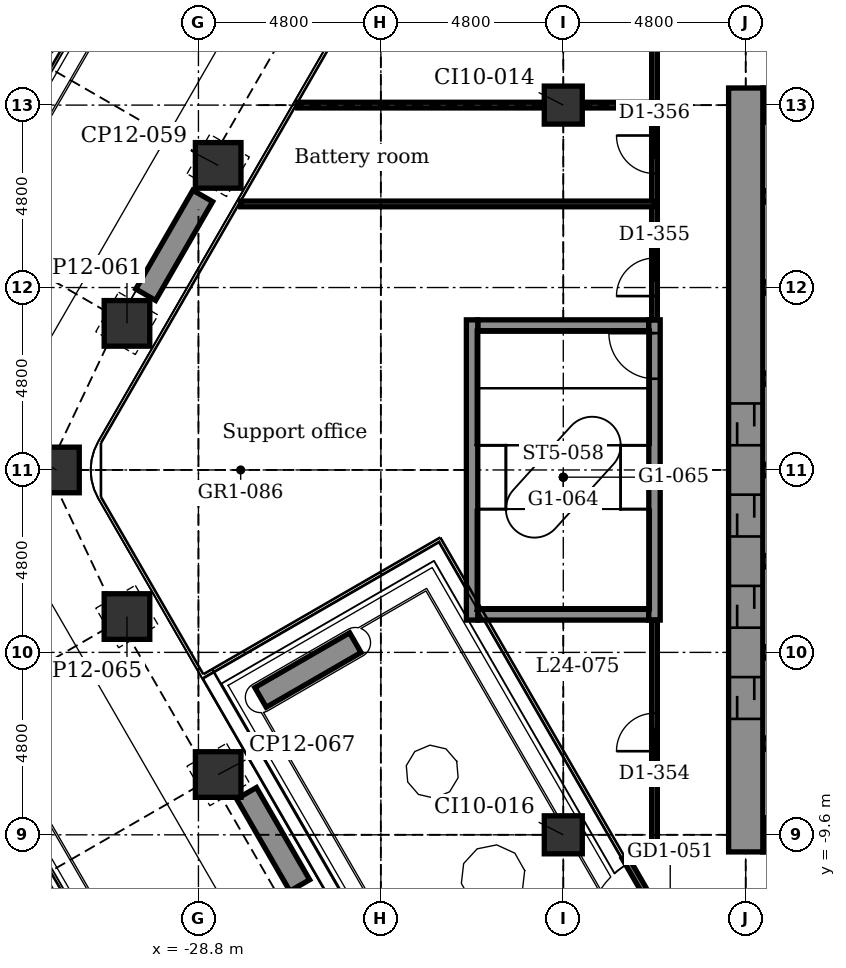
"""IFC4 building model, lengths in metres.
Left out: names, types, materials, properties, quantities, classifications, styles, units other than length and angle.
Written with IfcOpenShell. Run it as: python <this file> out.ifc"""

import sys

from ifc_helpers import new_model, si_unit, direction, frame, frame_2d, origin, origin_2d, place, context, subcontext, project, spatial, rectangle, extrude, element, fill, save


model = new_model("IFC4")
c1 = context("Model", 3, precision=1e-05, world=origin(), true_north=direction((0.0, 1.0)))
c2 = subcontext(c1, "Body", "Model", "MODEL_VIEW")
j1 = project(units=[si_unit("LENGTHUNIT", "METRE"), si_unit("PLANEANGLEUNIT", "RADIAN")], contexts=[c1])
p1 = place(None, origin())
s1 = spatial("IfcSite", under=j1, at=p1, CompositionType="ELEMENT")
p2 = place(p1, origin())
s2 = spatial("IfcBuilding", under=s1, at=p2, CompositionType="ELEMENT")
p3 = place(p2, frame((0.0, 0.0, 122.9)))
s3 = spatial("IfcBuildingStorey", under=s2, at=p3, CompositionType="ELEMENT", Elevation=122.9)
for number, where, z_axis, x_axis in (
    (1, (-28.28, -8.014, -0.2), (0.0, 0.0, 1.0), (0.866, 0.5, 0.0)),
    (2, (-30.68, -3.857, -0.2), (0.0, 0.0, 1.0), (0.866, 0.5, 0.0)),
    (3, (-32.536, 0.0, -0.2), (0.0, 0.0, 1.0), (1.0, 0.0, 0.0)),
    (4, (-30.68, 3.857, -0.2), (0.0, 0.0, 1.0), (0.5, 0.866, 0.0)),
    (5, (-28.28, 8.014, -0.2), (0.0, 0.0, 1.0), (0.5, 0.866, 0.0)),
):
    element("IfcColumn", number, at=place(p3, frame(where, z_axis=z_axis, x_axis=x_axis)), inside=s3, PredefinedType="COLUMN", context=c2, shape_type="SweptSolid", body=[
        extrude(rectangle(XDim=1.2, YDim=1.2, at=origin_2d()), origin(), (0.0, 0.0, 1.0), 4.4),
    ])
for number, where, z_axis, x_axis in (
    (6, (-19.2, -9.6, -0.2), (0.0, 0.0, 1.0), (1.0, 0.0, 0.0)),
    (7, (-19.2, 9.6, -0.2), (0.0, 0.0, 1.0), (1.0, 0.0, 0.0)),
):
    element("IfcColumn", number, at=place(p3, frame(where, z_axis=z_axis, x_axis=x_axis)), inside=s3, PredefinedType="COLUMN", context=c2, shape_type="SweptSolid", body=[
        extrude(rectangle(XDim=1.0, YDim=1.0, at=origin_2d()), origin(), (0.0, 0.0, 1.0), 4.4),
    ])
p4 = place(p3, frame((-13.95, -9.6, -0.2), z_axis=(0.0, 0.0, 1.0), x_axis=(1.0, 0.0, 0.0)))
e8 = element("IfcWall", 8, at=p4, inside=s3, PredefinedType="SHEAR", context=c2, shape_type="SweptSolid", body=[
    extrude(rectangle(XDim=3.9, YDim=0.9, at=frame_2d((1.95, 0.0))), origin(), (0.0, 0.0, 1.0), 4.4),
])
p5 = place(p4, frame((0.05, 0.0, 0.2)))
e9 = element("IfcOpeningElement", 9, at=p5, cuts=e8, PredefinedType="OPENING", context=c2, shape_type="SweptSolid", body=[
    extrude(rectangle(XDim=0.9, YDim=2.1, at=frame_2d((0.45, 1.05))), frame((0.0, 0.46, 0.0), z_axis=(0.0, -1.0, 0.0), x_axis=(1.0, 0.0, 0.0)), (0.0, 0.0, 1.0), 0.92),
])
p6 = place(p4, frame((1.5, 0.0, 0.2)))
e10 = element("IfcOpeningElement", 10, at=p6, cuts=e8, PredefinedType="OPENING", context=c2, shape_type="SweptSolid", body=[
    extrude(rectangle(XDim=0.9, YDim=2.1, at=frame_2d((0.45, 1.05))), frame((0.0, 0.46, 0.0), z_axis=(0.0, -1.0, 0.0), x_axis=(1.0, 0.0, 0.0)), (0.0, 0.0, 1.0), 0.92),
])
p7 = place(p4, frame((2.95, 0.0, 0.2)))
e11 = element("IfcOpeningElement", 11, at=p7, cuts=e8, PredefinedType="OPENING", context=c2, shape_type="SweptSolid", body=[
    extrude(rectangle(XDim=0.9, YDim=2.1, at=frame_2d((0.45, 1.05))), frame((0.0, 0.46, 0.0), z_axis=(0.0, -1.0, 0.0), x_axis=(1.0, 0.0, 0.0)), (0.0, 0.0, 1.0), 0.92),
])
for number, where, z_axis, x_axis in (
    (12, (-13.95, -7.2, -0.2), (0.0, 0.0, 1.0), (1.0, 0.0, 0.0)),
    (13, (-13.95, -4.8, -0.2), (0.0, 0.0, 1.0), (1.0, 0.0, 0.0)),
):
    element("IfcWall", number, at=place(p3, frame(where, z_axis=z_axis, x_axis=x_axis)), inside=s3, PredefinedType="STANDARD", context=c2, shape_type="SweptSolid", body=[
        extrude(rectangle(XDim=3.9, YDim=0.3, at=frame_2d((1.95, 0.0))), origin(), (0.0, 0.0, 1.0), 4.4),
    ])
p8 = place(p3, frame((-21.45, -3.8, -0.2), z_axis=(0.0, 0.0, 1.0), x_axis=(1.0, 0.0, 0.0)))
e14 = element("IfcWall", 14, at=p8, inside=s3, PredefinedType="STANDARD", context=c2, shape_type="SweptSolid", body=[
    extrude(rectangle(XDim=4.5, YDim=0.3, at=frame_2d((2.25, 0.0))), origin(), (0.0, 0.0, 1.0), 4.4),
])
for number, where, z_axis, x_axis in (
    (15, (-13.95, -2.4, -0.2), (0.0, 0.0, 1.0), (1.0, 0.0, 0.0)),
    (16, (-13.95, 0.0, -0.2), (0.0, 0.0, 1.0), (1.0, 0.0, 0.0)),
    (17, (-13.95, 2.4, -0.2), (0.0, 0.0, 1.0), (1.0, 0.0, 0.0)),
):
    element("IfcWall", number, at=place(p3, frame(where, z_axis=z_axis, x_axis=x_axis)), inside=s3, PredefinedType="STANDARD", context=c2, shape_type="SweptSolid", body=[
        extrude(rectangle(XDim=2.8, YDim=0.3, at=frame_2d((1.4, 0.0))), origin(), (0.0, 0.0, 1.0), 4.4),
    ])
p9 = place(p3, frame((-21.45, 3.8, -0.2), z_axis=(0.0, 0.0, 1.0), x_axis=(1.0, 0.0, 0.0)))
e18 = element("IfcWall", 18, at=p9, inside=s3, PredefinedType="STANDARD", context=c2, shape_type="SweptSolid", body=[
    extrude(rectangle(XDim=4.5, YDim=0.3, at=frame_2d((2.25, 0.0))), origin(), (0.0, 0.0, 1.0), 4.4),
])
for number, where, z_axis, x_axis in (
    (19, (-13.95, 4.8, -0.2), (0.0, 0.0, 1.0), (1.0, 0.0, 0.0)),
    (20, (-13.95, 7.2, -0.2), (0.0, 0.0, 1.0), (1.0, 0.0, 0.0)),
):
    element("IfcWall", number, at=place(p3, frame(where, z_axis=z_axis, x_axis=x_axis)), inside=s3, PredefinedType="STANDARD", context=c2, shape_type="SweptSolid", body=[
        extrude(rectangle(XDim=3.9, YDim=0.3, at=frame_2d((1.95, 0.0))), origin(), (0.0, 0.0, 1.0), 4.4),
    ])
p10 = place(p3, frame((-13.95, 9.6, -0.2), z_axis=(0.0, 0.0, 1.0), x_axis=(1.0, 0.0, 0.0)))
e21 = element("IfcWall", 21, at=p10, inside=s3, PredefinedType="SHEAR", context=c2, shape_type="SweptSolid", body=[
    extrude(rectangle(XDim=3.9, YDim=0.9, at=frame_2d((1.95, 0.0))), origin(), (0.0, 0.0, 1.0), 4.4),
])
p11 = place(p10, frame((0.05, 0.0, 0.2)))
e22 = element("IfcOpeningElement", 22, at=p11, cuts=e21, PredefinedType="OPENING", context=c2, shape_type="SweptSolid", body=[
    extrude(rectangle(XDim=0.9, YDim=2.1, at=frame_2d((0.45, 1.05))), frame((0.0, 0.46, 0.0), z_axis=(0.0, -1.0, 0.0), x_axis=(1.0, 0.0, 0.0)), (0.0, 0.0, 1.0), 0.92),
])
p12 = place(p10, frame((1.5, 0.0, 0.2)))
e23 = element("IfcOpeningElement", 23, at=p12, cuts=e21, PredefinedType="OPENING", context=c2, shape_type="SweptSolid", body=[
    extrude(rectangle(XDim=0.9, YDim=2.1, at=frame_2d((0.45, 1.05))), frame((0.0, 0.46, 0.0), z_axis=(0.0, -1.0, 0.0), x_axis=(1.0, 0.0, 0.0)), (0.0, 0.0, 1.0), 0.92),
])
p13 = place(p10, frame((2.95, 0.0, 0.2)))
e24 = element("IfcOpeningElement", 24, at=p13, cuts=e21, PredefinedType="OPENING", context=c2, shape_type="SweptSolid", body=[
    extrude(rectangle(XDim=0.9, YDim=2.1, at=frame_2d((0.45, 1.05))), frame((0.0, 0.46, 0.0), z_axis=(0.0, -1.0, 0.0), x_axis=(1.0, 0.0, 0.0)), (0.0, 0.0, 1.0), 0.92),
])
p14 = place(p3, frame((-21.6, -3.95, -0.2), z_axis=(0.0, 0.0, 1.0), x_axis=(0.0, 1.0, 0.0)))
e25 = element("IfcWall", 25, at=p14, inside=s3, PredefinedType="STANDARD", context=c2, shape_type="SweptSolid", body=[
    extrude(rectangle(XDim=7.9, YDim=0.3, at=frame_2d((3.95, 0.0))), origin(), (0.0, 0.0, 1.0), 4.4),
])
p15 = place(p3, frame((-16.8, -3.95, -0.2), z_axis=(0.0, 0.0, 1.0), x_axis=(0.0, 1.0, 0.0)))
e26 = element("IfcWall", 26, at=p15, inside=s3, PredefinedType="STANDARD", context=c2, shape_type="SweptSolid", body=[
    extrude(rectangle(XDim=7.9, YDim=0.3, at=frame_2d((3.95, 0.0))), origin(), (0.0, 0.0, 1.0), 4.4),
])
p16 = place(p15, frame((6.35, 0.0, 0.2)))
e27 = element("IfcOpeningElement", 27, at=p16, cuts=e26, PredefinedType="OPENING", context=c2, shape_type="SweptSolid", body=[
    extrude(rectangle(XDim=1.2, YDim=2.1, at=frame_2d((0.6, 1.05))), frame((0.0, 0.16, 0.0), z_axis=(0.0, -1.0, 0.0), x_axis=(1.0, 0.0, 0.0)), (0.0, 0.0, 1.0), 0.32),
])
p17 = place(p3, frame((-14.4, -10.05, -0.2), z_axis=(0.0, 0.0, 1.0), x_axis=(0.0, 1.0, 0.0)))
e28 = element("IfcWall", 28, at=p17, inside=s3, PredefinedType="SHEAR", context=c2, shape_type="SweptSolid", body=[
    extrude(rectangle(XDim=20.1, YDim=0.9, at=frame_2d((10.05, 0.0))), origin(), (0.0, 0.0, 1.0), 4.4),
])
p18 = place(p17, frame((3.5, 0.0, 0.2)))
e29 = element("IfcOpeningElement", 29, at=p18, cuts=e28, PredefinedType="OPENING", context=c2, shape_type="SweptSolid", body=[
    extrude(rectangle(XDim=1.1, YDim=2.1, at=frame_2d((0.55, 1.05))), frame((0.0, 0.46, 0.0), z_axis=(0.0, -1.0, 0.0), x_axis=(1.0, 0.0, 0.0)), (0.0, 0.0, 1.0), 0.92),
])
p19 = place(p17, frame((5.9, 0.0, 0.2)))
e30 = element("IfcOpeningElement", 30, at=p19, cuts=e28, PredefinedType="OPENING", context=c2, shape_type="SweptSolid", body=[
    extrude(rectangle(XDim=1.1, YDim=2.1, at=frame_2d((0.55, 1.05))), frame((0.0, 0.46, 0.0), z_axis=(0.0, -1.0, 0.0), x_axis=(1.0, 0.0, 0.0)), (0.0, 0.0, 1.0), 0.92),
])
p20 = place(p17, frame((8.3, 0.0, 0.2)))
e31 = element("IfcOpeningElement", 31, at=p20, cuts=e28, PredefinedType="OPENING", context=c2, shape_type="SweptSolid", body=[
    extrude(rectangle(XDim=1.1, YDim=2.1, at=frame_2d((0.55, 1.05))), frame((0.0, 0.46, 0.0), z_axis=(0.0, -1.0, 0.0), x_axis=(1.0, 0.0, 0.0)), (0.0, 0.0, 1.0), 0.92),
])
p21 = place(p17, frame((10.7, 0.0, 0.2)))
e32 = element("IfcOpeningElement", 32, at=p21, cuts=e28, PredefinedType="OPENING", context=c2, shape_type="SweptSolid", body=[
    extrude(rectangle(XDim=1.1, YDim=2.1, at=frame_2d((0.55, 1.05))), frame((0.0, 0.46, 0.0), z_axis=(0.0, -1.0, 0.0), x_axis=(1.0, 0.0, 0.0)), (0.0, 0.0, 1.0), 0.92),
])
p22 = place(p3, frame((-15.191, -14.325, 0.0), z_axis=(0.0, 0.0, 1.0), x_axis=(-0.500001003139, 0.866024824621, 0.0)))
e33 = element("IfcWall", 33, at=p22, inside=s3, PredefinedType="PARTITIONING", context=c2, shape_type="SweptSolid", body=[
    extrude(rectangle(XDim=4.78, YDim=0.16, at=frame_2d((2.39, 0.0))), origin(), (0.0, 0.0, 1.0), 4.2),
])
p23 = place(p22, frame((1.19, 0.0, 0.0)))
e34 = element("IfcOpeningElement", 34, at=p23, cuts=e33, PredefinedType="OPENING", context=c2, shape_type="SweptSolid", body=[
    extrude(rectangle(XDim=2.4, YDim=2.4, at=frame_2d((1.2, 1.2))), frame((0.0, 0.09, 0.0), z_axis=(0.0, -1.0, 0.0), x_axis=(1.0, 0.0, 0.0)), (0.0, 0.0, 1.0), 0.18),
])
p24 = place(p3, frame((-30.187, 4.611, 0.0), z_axis=(0.0, 0.0, 1.0), x_axis=(0.499990139034, 0.866031096941, 0.0)))
e35 = element("IfcWall", 35, at=p24, inside=s3, PredefinedType="USERDEFINED", context=c2, shape_type="SweptSolid", body=[
    extrude(rectangle(XDim=3.0, YDim=0.6, at=frame_2d((1.5, 0.0))), origin(), (0.0, 0.0, 1.0), 0.7),
])
p25 = place(p3, frame((-24.671, -4.545, 0.0), z_axis=(0.0, 0.0, 1.0), x_axis=(-0.866054314686, -0.499949921505, 0.0)))
e36 = element("IfcWall", 36, at=p25, inside=s3, PredefinedType="USERDEFINED", context=c2, shape_type="SweptSolid", body=[
    extrude(rectangle(XDim=2.88, YDim=0.6, at=frame_2d((1.44, 0.0))), origin(), (0.0, 0.0, 1.0), 0.7),
])
p26 = place(p3, frame((-26.134, -10.932, 0.0), z_axis=(0.0, 0.0, 1.0), x_axis=(-0.49994636267, 0.866056369097, 0.0)))
e37 = element("IfcWall", 37, at=p26, inside=s3, PredefinedType="USERDEFINED", context=c2, shape_type="SweptSolid", body=[
    extrude(rectangle(XDim=2.8, YDim=0.6, at=frame_2d((1.4, 0.0))), origin(), (0.0, 0.0, 1.0), 0.7),
])
p27 = place(p3, frame((-16.8, -10.0, 0.0), z_axis=(0.0, 0.0, 1.0), x_axis=(0.0, 1.0, 0.0)))
e38 = element("IfcWall", 38, at=p27, inside=s3, PredefinedType="PARTITIONING", context=c2, shape_type="SweptSolid", body=[
    extrude(rectangle(XDim=6.05, YDim=0.15, at=frame_2d((3.025, 0.0))), origin(), (0.0, 0.0, 1.0), 4.2),
])
p28 = place(p27, frame((2.6, 0.0, 0.0)))
e39 = element("IfcOpeningElement", 39, at=p28, cuts=e38, PredefinedType="OPENING", context=c2, shape_type="SweptSolid", body=[
    extrude(rectangle(XDim=1.0, YDim=2.1, at=frame_2d((0.5, 1.05))), frame((0.0, 0.085, 0.0), z_axis=(0.0, -1.0, 0.0), x_axis=(1.0, 0.0, 0.0)), (0.0, 0.0, 1.0), 0.17),
])
p29 = place(p3, frame((-16.8, 3.95, 0.0), z_axis=(0.0, 0.0, 1.0), x_axis=(0.0, 1.0, 0.0)))
e40 = element("IfcWall", 40, at=p29, inside=s3, PredefinedType="PARTITIONING", context=c2, shape_type="SweptSolid", body=[
    extrude(rectangle(XDim=9.35, YDim=0.15, at=frame_2d((4.675, 0.0))), origin(), (0.0, 0.0, 1.0), 4.2),
])
p30 = place(p29, frame((0.625, 0.0, 0.0)))
e41 = element("IfcOpeningElement", 41, at=p30, cuts=e40, PredefinedType="OPENING", context=c2, shape_type="SweptSolid", body=[
    extrude(rectangle(XDim=1.0, YDim=2.1, at=frame_2d((0.5, 1.05))), frame((0.0, 0.085, 0.0), z_axis=(0.0, -1.0, 0.0), x_axis=(1.0, 0.0, 0.0)), (0.0, 0.0, 1.0), 0.17),
])
p31 = place(p29, frame((3.85, 0.0, 0.0)))
e42 = element("IfcOpeningElement", 42, at=p31, cuts=e40, PredefinedType="OPENING", context=c2, shape_type="SweptSolid", body=[
    extrude(rectangle(XDim=1.0, YDim=2.1, at=frame_2d((0.5, 1.05))), frame((0.0, 0.085, 0.0), z_axis=(0.0, -1.0, 0.0), x_axis=(1.0, 0.0, 0.0)), (0.0, 0.0, 1.0), 0.17),
])
p32 = place(p29, frame((7.2, 0.0, 0.0)))
e43 = element("IfcOpeningElement", 43, at=p32, cuts=e40, PredefinedType="OPENING", context=c2, shape_type="SweptSolid", body=[
    extrude(rectangle(XDim=1.0, YDim=2.1, at=frame_2d((0.5, 1.05))), frame((0.0, 0.085, 0.0), z_axis=(0.0, -1.0, 0.0), x_axis=(1.0, 0.0, 0.0)), (0.0, 0.0, 1.0), 0.17),
])
p33 = place(p3, frame((-27.688, 7.0, 0.0), z_axis=(0.0, 0.0, 1.0), x_axis=(1.0, 0.0, 0.0)))
e44 = element("IfcWall", 44, at=p33, inside=s3, PredefinedType="PARTITIONING", context=c2, shape_type="SweptSolid", body=[
    extrude(rectangle(XDim=10.888, YDim=0.15, at=frame_2d((5.444, 0.0))), origin(), (0.0, 0.0, 1.0), 4.2),
])
p34 = place(p3, frame((-26.187, 9.6, 0.0), z_axis=(0.0, 0.0, 1.0), x_axis=(1.0, 0.0, 0.0)))
e45 = element("IfcWall", 45, at=p34, inside=s3, PredefinedType="PARTITIONING", context=c2, shape_type="SweptSolid", body=[
    extrude(rectangle(XDim=6.487, YDim=0.15, at=frame_2d((3.243, 0.0))), origin(), (0.0, 0.0, 1.0), 3.592),
])
p35 = place(p3, frame((-18.7, 9.6, 0.0), z_axis=(0.0, 0.0, 1.0), x_axis=(1.0, 0.0, 0.0)))
e46 = element("IfcWall", 46, at=p35, inside=s3, PredefinedType="PARTITIONING", context=c2, shape_type="SweptSolid", body=[
    extrude(rectangle(XDim=1.9, YDim=0.15, at=frame_2d((0.95, 0.0))), origin(), (0.0, 0.0, 1.0), 3.592),
])
p36 = place(p28, origin())
e47 = element("IfcDoor", 47, at=p36, inside=s3, OperationType="SINGLE_SWING_LEFT", PredefinedType="DOOR", context=c2, shape_type="SweptSolid", body=[
    extrude(rectangle(XDim=1.0, YDim=2.1, at=frame_2d((0.5, 1.05))), frame((0.0, 0.025, 0.0), z_axis=(0.0, -1.0, 0.0), x_axis=(1.0, 0.0, 0.0)), (0.0, 0.0, 1.0), 0.05),
])
fill(e39, e47)
p37 = place(p30, origin())
e48 = element("IfcDoor", 48, at=p37, inside=s3, OperationType="SINGLE_SWING_LEFT", PredefinedType="DOOR", context=c2, shape_type="SweptSolid", body=[
    extrude(rectangle(XDim=1.0, YDim=2.1, at=frame_2d((0.5, 1.05))), frame((0.0, 0.025, 0.0), z_axis=(0.0, -1.0, 0.0), x_axis=(1.0, 0.0, 0.0)), (0.0, 0.0, 1.0), 0.05),
])
fill(e41, e48)
p38 = place(p31, origin())
e49 = element("IfcDoor", 49, at=p38, inside=s3, OperationType="SINGLE_SWING_RIGHT", PredefinedType="DOOR", context=c2, shape_type="SweptSolid", body=[
    extrude(rectangle(XDim=1.0, YDim=2.1, at=frame_2d((0.5, 1.05))), frame((0.0, 0.025, 0.0), z_axis=(0.0, -1.0, 0.0), x_axis=(1.0, 0.0, 0.0)), (0.0, 0.0, 1.0), 0.05),
])
fill(e42, e49)
p39 = place(p18, origin())
e50 = element("IfcDoor", 50, at=p39, inside=s3, OperationType="DOUBLE_DOOR_SLIDING", PredefinedType="DOOR", context=c2, shape_type="SweptSolid", body=[
    extrude(rectangle(XDim=1.1, YDim=2.1, at=frame_2d((0.55, 1.05))), frame((0.0, 0.025, 0.0), z_axis=(0.0, -1.0, 0.0), x_axis=(1.0, 0.0, 0.0)), (0.0, 0.0, 1.0), 0.05),
])
fill(e29, e50)
p40 = place(p19, origin())
e51 = element("IfcDoor", 51, at=p40, inside=s3, OperationType="DOUBLE_DOOR_SLIDING", PredefinedType="DOOR", context=c2, shape_type="SweptSolid", body=[
    extrude(rectangle(XDim=1.1, YDim=2.1, at=frame_2d((0.55, 1.05))), frame((0.0, 0.025, 0.0), z_axis=(0.0, -1.0, 0.0), x_axis=(1.0, 0.0, 0.0)), (0.0, 0.0, 1.0), 0.05),
])
fill(e30, e51)
p41 = place(p20, origin())
e52 = element("IfcDoor", 52, at=p41, inside=s3, OperationType="DOUBLE_DOOR_SLIDING", PredefinedType="DOOR", context=c2, shape_type="SweptSolid", body=[
    extrude(rectangle(XDim=1.1, YDim=2.1, at=frame_2d((0.55, 1.05))), frame((0.0, 0.025, 0.0), z_axis=(0.0, -1.0, 0.0), x_axis=(1.0, 0.0, 0.0)), (0.0, 0.0, 1.0), 0.05),
])
fill(e31, e52)
p42 = place(p21, origin())
e53 = element("IfcDoor", 53, at=p42, inside=s3, OperationType="DOUBLE_DOOR_SLIDING", PredefinedType="DOOR", context=c2, shape_type="SweptSolid", body=[
    extrude(rectangle(XDim=1.1, YDim=2.1, at=frame_2d((0.55, 1.05))), frame((0.0, 0.025, 0.0), z_axis=(0.0, -1.0, 0.0), x_axis=(1.0, 0.0, 0.0)), (0.0, 0.0, 1.0), 0.05),
])
fill(e32, e53)
p43 = place(p16, origin())
e54 = element("IfcDoor", 54, at=p43, inside=s3, OperationType="SINGLE_SWING_RIGHT", PredefinedType="DOOR", context=c2, shape_type="SweptSolid", body=[
    extrude(rectangle(XDim=1.2, YDim=2.1, at=frame_2d((0.6, 1.05))), frame((0.0, 0.025, 0.0), z_axis=(0.0, -1.0, 0.0), x_axis=(1.0, 0.0, 0.0)), (0.0, 0.0, 1.0), 0.05),
])
fill(e27, e54)
p44 = place(p5, origin())
e55 = element("IfcDoor", 55, at=p44, inside=s3, OperationType="SINGLE_SWING_RIGHT", PredefinedType="DOOR", context=c2, shape_type="SweptSolid", body=[
    extrude(rectangle(XDim=0.9, YDim=2.1, at=frame_2d((0.45, 1.05))), frame((0.0, 0.025, 0.0), z_axis=(0.0, -1.0, 0.0), x_axis=(1.0, 0.0, 0.0)), (0.0, 0.0, 1.0), 0.05),
])
fill(e9, e55)
p45 = place(p11, frame((0.9, 0.0, 0.0), z_axis=(0.0, 0.0, 1.0), x_axis=(-1.0, 0.0, 0.0)))
e56 = element("IfcDoor", 56, at=p45, inside=s3, OperationType="SINGLE_SWING_RIGHT", PredefinedType="DOOR", context=c2, shape_type="SweptSolid", body=[
    extrude(rectangle(XDim=0.9, YDim=2.1, at=frame_2d((0.45, 1.05))), frame((0.0, 0.025, 0.0), z_axis=(0.0, -1.0, 0.0), x_axis=(1.0, 0.0, 0.0)), (0.0, 0.0, 1.0), 0.05),
])
fill(e22, e56)
save(model, sys.argv[1])
